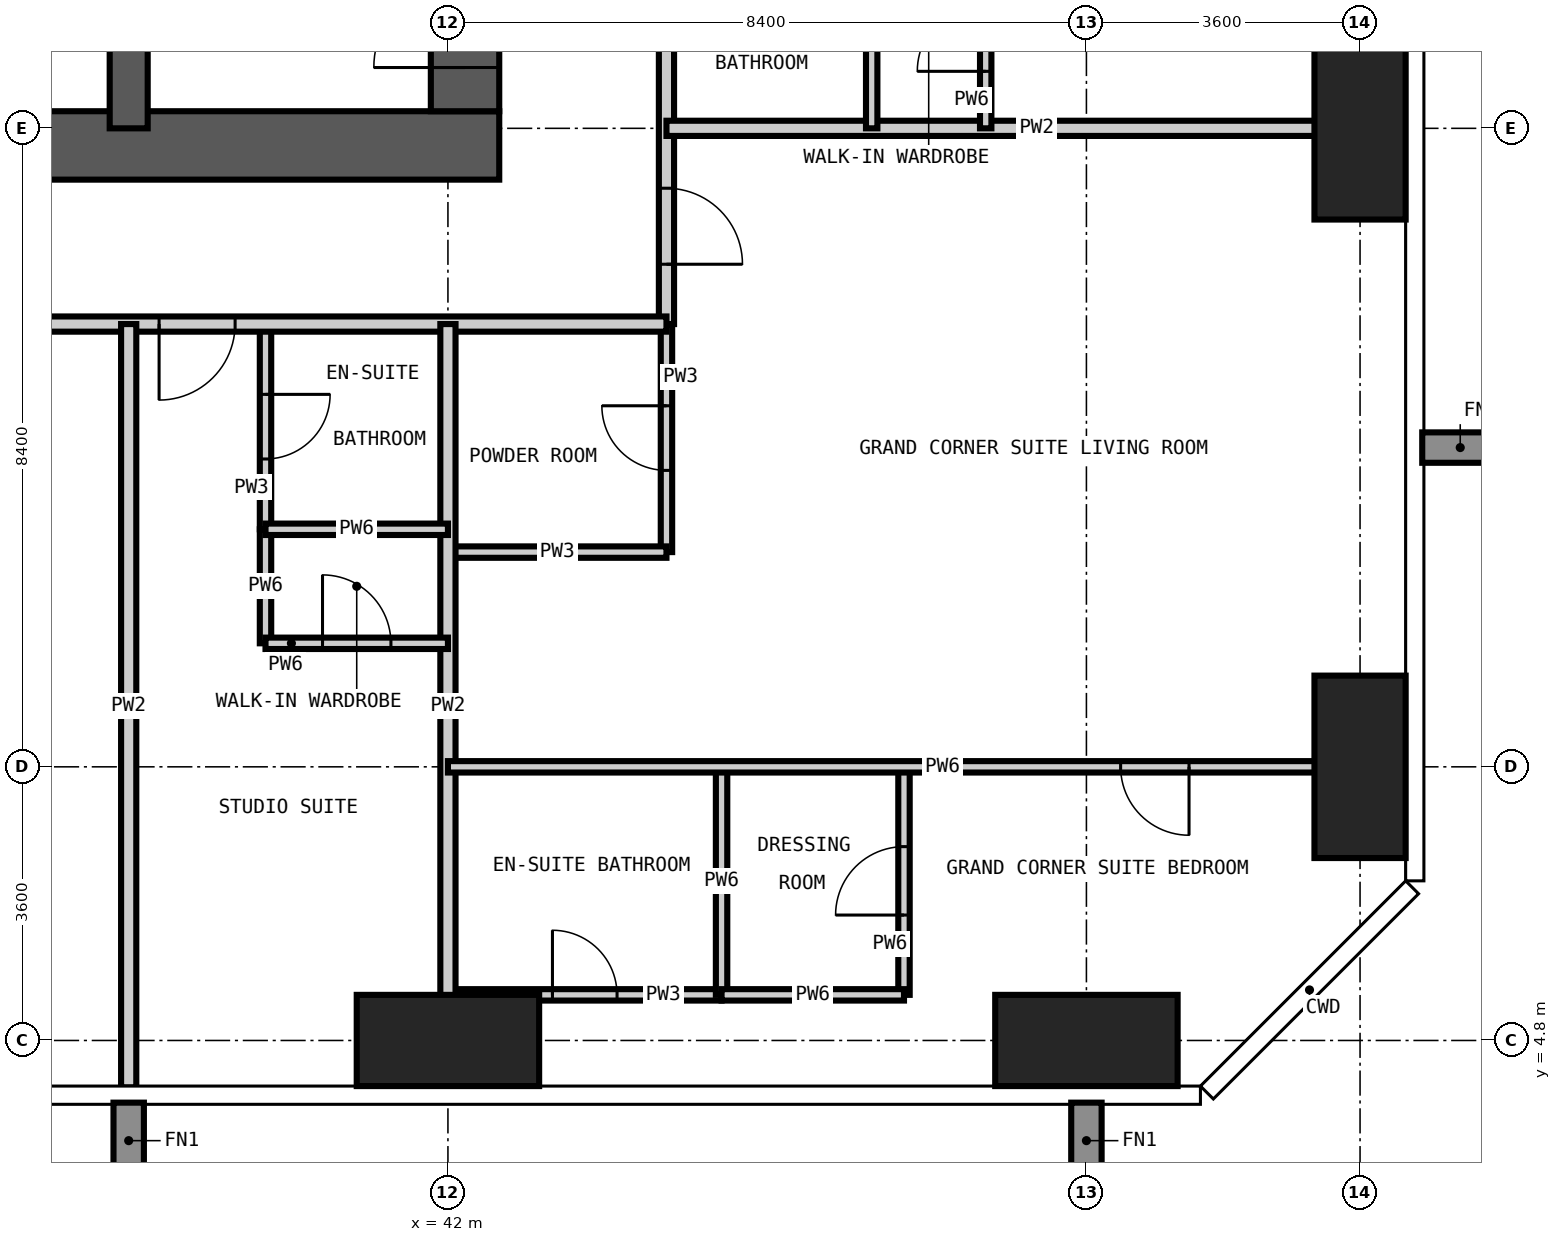
"""IFC4 building model, lengths in metres.
Left out: names, types, materials, properties, quantities, classifications, styles, units other than length and angle.
Written with IfcOpenShell. Run it as: python <this file> out.ifc"""

import sys

from ifc_helpers import new_model, si_unit, direction, frame, frame_2d, origin, origin_2d, place, context, subcontext, project, spatial, rectangle, extrude, element, fill, save


model = new_model("IFC4")
c1 = context("Model", 3, precision=1e-05, world=origin(), true_north=direction((0.0, 1.0)))
c2 = subcontext(c1, "Body", "Model", "MODEL_VIEW")
j1 = project(units=[si_unit("LENGTHUNIT", "METRE"), si_unit("PLANEANGLEUNIT", "RADIAN")], contexts=[c1])
p1 = place(None, origin())
s1 = spatial("IfcSite", under=j1, at=p1, CompositionType="ELEMENT")
p2 = place(p1, origin())
s2 = spatial("IfcBuilding", under=s1, at=p2, CompositionType="ELEMENT")
p3 = place(p2, frame((0.0, 0.0, 233.4)))
s3 = spatial("IfcBuildingStorey", under=s2, at=p3, CompositionType="ELEMENT", Elevation=233.4)
for number, where, z_axis, x_axis in (
    (1, (42.0, 4.8, -0.35), (0.0, 0.0, 1.0), (1.0, 0.0, 0.0)),
    (2, (50.4, 4.8, -0.35), (0.0, 0.0, 1.0), (1.0, 0.0, 0.0)),
):
    element("IfcColumn", number, at=place(p3, frame(where, z_axis=z_axis, x_axis=x_axis)), inside=s3, PredefinedType="COLUMN", context=c2, shape_type="SweptSolid", body=[
        extrude(rectangle(XDim=2.4, YDim=1.2, at=origin_2d()), origin(), (0.0, 0.0, 1.0), 3.9),
    ])
for number, where, z_axis, x_axis in (
    (3, (54.0, 8.4, -0.35), (0.0, 0.0, 1.0), (1.0, 0.0, 0.0)),
    (4, (54.0, 16.8, -0.35), (0.0, 0.0, 1.0), (1.0, 0.0, 0.0)),
):
    element("IfcColumn", number, at=place(p3, frame(where, z_axis=z_axis, x_axis=x_axis)), inside=s3, PredefinedType="COLUMN", context=c2, shape_type="SweptSolid", body=[
        extrude(rectangle(XDim=1.2, YDim=2.4, at=origin_2d()), origin(), (0.0, 0.0, 1.0), 3.9),
    ])
p4 = place(p3, frame((24.525, 16.575, -0.35), z_axis=(0.0, 0.0, 1.0), x_axis=(1.0, 0.0, 0.0)))
e5 = element("IfcWall", 5, at=p4, inside=s3, PredefinedType="SHEAR", context=c2, shape_type="SweptSolid", body=[
    extrude(rectangle(XDim=18.15, YDim=0.9, at=frame_2d((9.075, 0.0))), origin(), (0.0, 0.0, 1.0), 3.9),
])
p5 = place(p4, frame((4.375, 0.0, 0.35)))
e6 = element("IfcOpeningElement", 6, at=p5, cuts=e5, PredefinedType="OPENING", context=c2, shape_type="SweptSolid", body=[
    extrude(rectangle(XDim=1.0, YDim=2.1, at=frame_2d((0.5, 1.05))), frame((0.0, 0.46, 0.0), z_axis=(0.0, -1.0, 0.0), x_axis=(1.0, 0.0, 0.0)), (0.0, 0.0, 1.0), 0.92),
])
p6 = place(p4, frame((10.675, 0.0, 0.35)))
e7 = element("IfcOpeningElement", 7, at=p6, cuts=e5, PredefinedType="OPENING", context=c2, shape_type="SweptSolid", body=[
    extrude(rectangle(XDim=1.0, YDim=2.1, at=frame_2d((0.5, 1.05))), frame((0.0, 0.46, 0.0), z_axis=(0.0, -1.0, 0.0), x_axis=(1.0, 0.0, 0.0)), (0.0, 0.0, 1.0), 0.92),
])
p7 = place(p3, frame((42.225, 17.025, -0.35), z_axis=(0.0, 0.0, 1.0), x_axis=(0.0, 1.0, 0.0)))
e8 = element("IfcWall", 8, at=p7, inside=s3, PredefinedType="SHEAR", context=c2, shape_type="SweptSolid", body=[
    extrude(rectangle(XDim=24.75, YDim=0.9, at=frame_2d((12.375, 0.0))), origin(), (0.0, 0.0, 1.0), 3.9),
])
p8 = place(p7, frame((0.575, 0.0, 0.35)))
e9 = element("IfcOpeningElement", 9, at=p8, cuts=e8, PredefinedType="OPENING", context=c2, shape_type="SweptSolid", body=[
    extrude(rectangle(XDim=1.2, YDim=2.2, at=frame_2d((0.6, 1.1))), frame((0.0, 0.46, 0.0), z_axis=(0.0, -1.0, 0.0), x_axis=(1.0, 0.0, 0.0)), (0.0, 0.0, 1.0), 0.92),
])
p9 = place(p7, frame((11.475, 0.0, 0.35)))
e10 = element("IfcOpeningElement", 10, at=p9, cuts=e8, PredefinedType="OPENING", context=c2, shape_type="SweptSolid", body=[
    extrude(rectangle(XDim=1.8, YDim=2.2, at=frame_2d((0.9, 1.1))), frame((0.0, 0.46, 0.0), z_axis=(0.0, -1.0, 0.0), x_axis=(1.0, 0.0, 0.0)), (0.0, 0.0, 1.0), 0.92),
])
p10 = place(p7, frame((20.275, 0.0, 0.35)))
e11 = element("IfcOpeningElement", 11, at=p10, cuts=e8, PredefinedType="OPENING", context=c2, shape_type="SweptSolid", body=[
    extrude(rectangle(XDim=1.0, YDim=2.1, at=frame_2d((0.5, 1.05))), frame((0.0, 0.46, 0.0), z_axis=(0.0, -1.0, 0.0), x_axis=(1.0, 0.0, 0.0)), (0.0, 0.0, 1.0), 0.92),
])
p11 = place(p3, frame((37.8, 16.8, -0.35), z_axis=(0.0, 0.0, 1.0), x_axis=(0.0, 1.0, 0.0)))
e12 = element("IfcWall", 12, at=p11, inside=s3, PredefinedType="SHEAR", context=c2, shape_type="SweptSolid", body=[
    extrude(rectangle(XDim=11.2, YDim=0.5, at=frame_2d((5.6, 0.0))), origin(), (0.0, 0.0, 1.0), 3.9),
])
p12 = place(p3, frame((39.6, 11.525, 0.0), z_axis=(0.0, 0.0, 1.0), x_axis=(0.0, 1.0, 0.0)))
e13 = element("IfcWall", 13, at=p12, inside=s3, PredefinedType="PARTITIONING", context=c2, shape_type="SweptSolid", body=[
    extrude(rectangle(XDim=2.7, YDim=0.15, at=frame_2d((1.35, 0.0))), origin(), (0.0, 0.0, 1.0), 3.55),
])
p13 = place(p12, frame((0.925, 0.0, 0.0)))
e14 = element("IfcOpeningElement", 14, at=p13, cuts=e13, PredefinedType="OPENING", context=c2, shape_type="SweptSolid", body=[
    extrude(rectangle(XDim=0.85, YDim=2.1, at=frame_2d((0.425, 1.05))), frame((0.0, 0.085, 0.0), z_axis=(0.0, -1.0, 0.0), x_axis=(1.0, 0.0, 0.0)), (0.0, 0.0, 1.0), 0.17),
])
p14 = place(p3, frame((44.875, 11.225, 0.0), z_axis=(0.0, 0.0, 1.0), x_axis=(0.0, 1.0, 0.0)))
e15 = element("IfcWall", 15, at=p14, inside=s3, PredefinedType="PARTITIONING", context=c2, shape_type="SweptSolid", body=[
    extrude(rectangle(XDim=3.0, YDim=0.15, at=frame_2d((1.5, 0.0))), origin(), (0.0, 0.0, 1.0), 3.55),
])
p15 = place(p14, frame((1.075, 0.0, 0.0)))
e16 = element("IfcOpeningElement", 16, at=p15, cuts=e15, PredefinedType="OPENING", context=c2, shape_type="SweptSolid", body=[
    extrude(rectangle(XDim=0.85, YDim=2.1, at=frame_2d((0.425, 1.05))), frame((0.0, 0.085, 0.0), z_axis=(0.0, -1.0, 0.0), x_axis=(1.0, 0.0, 0.0)), (0.0, 0.0, 1.0), 0.17),
])
p16 = place(p3, frame((42.0, 5.4, 0.0), z_axis=(0.0, 0.0, 1.0), x_axis=(1.0, 0.0, 0.0)))
e17 = element("IfcWall", 17, at=p16, inside=s3, PredefinedType="PARTITIONING", context=c2, shape_type="SweptSolid", body=[
    extrude(rectangle(XDim=3.6, YDim=0.15, at=frame_2d((1.8, 0.0))), origin(), (0.0, 0.0, 1.0), 3.55),
])
p17 = place(p16, frame((1.375, 0.0, 0.0)))
e18 = element("IfcOpeningElement", 18, at=p17, cuts=e17, PredefinedType="OPENING", context=c2, shape_type="SweptSolid", body=[
    extrude(rectangle(XDim=0.85, YDim=2.1, at=frame_2d((0.425, 1.05))), frame((0.0, 0.085, 0.0), z_axis=(0.0, -1.0, 0.0), x_axis=(1.0, 0.0, 0.0)), (0.0, 0.0, 1.0), 0.17),
])
p18 = place(p3, frame((42.0, 11.225, 0.0), z_axis=(0.0, 0.0, 1.0), x_axis=(1.0, 0.0, 0.0)))
e19 = element("IfcWall", 19, at=p18, inside=s3, PredefinedType="PARTITIONING", context=c2, shape_type="SweptSolid", body=[
    extrude(rectangle(XDim=2.875, YDim=0.15, at=frame_2d((1.438, 0.0))), origin(), (0.0, 0.0, 1.0), 3.55),
])
p19 = place(p3, frame((44.875, 29.4, 0.0), z_axis=(0.0, 0.0, 1.0), x_axis=(0.0, -1.0, 0.0)))
e20 = element("IfcWall", 20, at=p19, inside=s3, PredefinedType="PARTITIONING", context=c2, shape_type="SweptSolid", body=[
    extrude(rectangle(XDim=15.175, YDim=0.2, at=frame_2d((7.587, 0.0))), origin(), (0.0, 0.0, 1.0), 3.55),
])
p20 = place(p19, frame((5.8, 0.0, 0.0)))
e21 = element("IfcOpeningElement", 21, at=p20, cuts=e20, PredefinedType="OPENING", context=c2, shape_type="SweptSolid", body=[
    extrude(rectangle(XDim=1.0, YDim=2.2, at=frame_2d((0.5, 1.1))), frame((0.0, 0.11, 0.0), z_axis=(0.0, -1.0, 0.0), x_axis=(1.0, 0.0, 0.0)), (0.0, 0.0, 1.0), 0.22),
])
p21 = place(p19, frame((13.388, 0.0, 0.0)))
e22 = element("IfcOpeningElement", 22, at=p21, cuts=e20, PredefinedType="OPENING", context=c2, shape_type="SweptSolid", body=[
    extrude(rectangle(XDim=1.0, YDim=2.2, at=frame_2d((0.5, 1.1))), frame((0.0, 0.11, 0.0), z_axis=(0.0, -1.0, 0.0), x_axis=(1.0, 0.0, 0.0)), (0.0, 0.0, 1.0), 0.22),
])
p22 = place(p3, frame((44.875, 14.225, 0.0), z_axis=(0.0, 0.0, 1.0), x_axis=(-1.0, 0.0, 0.0)))
e23 = element("IfcWall", 23, at=p22, inside=s3, PredefinedType="PARTITIONING", context=c2, shape_type="SweptSolid", body=[
    extrude(rectangle(XDim=22.25, YDim=0.2, at=frame_2d((11.125, 0.0))), origin(), (0.0, 0.0, 1.0), 3.55),
])
p23 = place(p22, frame((15.875, 0.0, 0.0)))
e24 = element("IfcOpeningElement", 24, at=p23, cuts=e23, PredefinedType="OPENING", context=c2, shape_type="SweptSolid", body=[
    extrude(rectangle(XDim=1.0, YDim=2.2, at=frame_2d((0.5, 1.1))), frame((0.0, 0.11, 0.0), z_axis=(0.0, -1.0, 0.0), x_axis=(1.0, 0.0, 0.0)), (0.0, 0.0, 1.0), 0.22),
])
p24 = place(p22, frame((9.425, 0.0, 0.0)))
e25 = element("IfcOpeningElement", 25, at=p24, cuts=e23, PredefinedType="OPENING", context=c2, shape_type="SweptSolid", body=[
    extrude(rectangle(XDim=1.0, YDim=2.2, at=frame_2d((0.5, 1.1))), frame((0.0, 0.11, 0.0), z_axis=(0.0, -1.0, 0.0), x_axis=(1.0, 0.0, 0.0)), (0.0, 0.0, 1.0), 0.22),
])
p25 = place(p22, frame((5.675, 0.0, 0.0)))
e26 = element("IfcOpeningElement", 26, at=p25, cuts=e23, PredefinedType="OPENING", context=c2, shape_type="SweptSolid", body=[
    extrude(rectangle(XDim=1.0, YDim=2.2, at=frame_2d((0.5, 1.1))), frame((0.0, 0.11, 0.0), z_axis=(0.0, -1.0, 0.0), x_axis=(1.0, 0.0, 0.0)), (0.0, 0.0, 1.0), 0.22),
])
for number, where, z_axis, x_axis in (
    (27, (37.8, 4.182, 0.0), (0.0, 0.0, 1.0), (0.0, 1.0, 0.0)),
    (28, (42.0, 4.182, 0.0), (0.0, 0.0, 1.0), (0.0, 1.0, 0.0)),
):
    element("IfcWall", number, at=place(p3, frame(where, z_axis=z_axis, x_axis=x_axis)), inside=s3, PredefinedType="PARTITIONING", context=c2, shape_type="SweptSolid", body=[
        extrude(rectangle(XDim=10.043, YDim=0.2, at=frame_2d((5.021, 0.0))), origin(), (0.0, 0.0, 1.0), 3.55),
    ])
p26 = place(p3, frame((44.875, 16.8, 0.0), z_axis=(0.0, 0.0, 1.0), x_axis=(1.0, 0.0, 0.0)))
e29 = element("IfcWall", 29, at=p26, inside=s3, PredefinedType="PARTITIONING", context=c2, shape_type="SweptSolid", body=[
    extrude(rectangle(XDim=9.743, YDim=0.2, at=frame_2d((4.872, 0.0))), origin(), (0.0, 0.0, 1.0), 3.55),
])
p27 = place(p3, frame((39.6, 10.025, 0.0), z_axis=(0.0, 0.0, 1.0), x_axis=(0.0, 1.0, 0.0)))
e30 = element("IfcWall", 30, at=p27, inside=s3, PredefinedType="PARTITIONING", context=c2, shape_type="SweptSolid", body=[
    extrude(rectangle(XDim=1.5, YDim=0.15, at=frame_2d((0.75, 0.0))), origin(), (0.0, 0.0, 1.0), 3.55),
])
p28 = place(p3, frame((45.6, 5.4, 0.0), z_axis=(0.0, 0.0, 1.0), x_axis=(0.0, 1.0, 0.0)))
e31 = element("IfcWall", 31, at=p28, inside=s3, PredefinedType="PARTITIONING", context=c2, shape_type="SweptSolid", body=[
    extrude(rectangle(XDim=3.0, YDim=0.15, at=frame_2d((1.5, 0.0))), origin(), (0.0, 0.0, 1.0), 3.55),
])
p29 = place(p3, frame((47.575, 16.8, 0.0), z_axis=(0.0, 0.0, 1.0), x_axis=(0.0, 1.0, 0.0)))
e32 = element("IfcWall", 32, at=p29, inside=s3, PredefinedType="PARTITIONING", context=c2, shape_type="SweptSolid", body=[
    extrude(rectangle(XDim=2.4, YDim=0.15, at=frame_2d((1.2, 0.0))), origin(), (0.0, 0.0, 1.0), 3.55),
])
p30 = place(p3, frame((48.0, 5.4, 0.0), z_axis=(0.0, 0.0, 1.0), x_axis=(0.0, 1.0, 0.0)))
e33 = element("IfcWall", 33, at=p30, inside=s3, PredefinedType="PARTITIONING", context=c2, shape_type="SweptSolid", body=[
    extrude(rectangle(XDim=3.0, YDim=0.15, at=frame_2d((1.5, 0.0))), origin(), (0.0, 0.0, 1.0), 3.55),
])
p31 = place(p30, frame((1.05, 0.0, 0.0)))
e34 = element("IfcOpeningElement", 34, at=p31, cuts=e33, PredefinedType="OPENING", context=c2, shape_type="SweptSolid", body=[
    extrude(rectangle(XDim=0.9, YDim=2.1, at=frame_2d((0.45, 1.05))), frame((0.0, 0.085, 0.0), z_axis=(0.0, -1.0, 0.0), x_axis=(1.0, 0.0, 0.0)), (0.0, 0.0, 1.0), 0.17),
])
p32 = place(p3, frame((49.075, 16.8, 0.0), z_axis=(0.0, 0.0, 1.0), x_axis=(0.0, 1.0, 0.0)))
e35 = element("IfcWall", 35, at=p32, inside=s3, PredefinedType="PARTITIONING", context=c2, shape_type="SweptSolid", body=[
    extrude(rectangle(XDim=2.4, YDim=0.15, at=frame_2d((1.2, 0.0))), origin(), (0.0, 0.0, 1.0), 3.55),
])
p33 = place(p32, frame((0.75, 0.0, 0.0)))
e36 = element("IfcOpeningElement", 36, at=p33, cuts=e35, PredefinedType="OPENING", context=c2, shape_type="SweptSolid", body=[
    extrude(rectangle(XDim=0.9, YDim=2.1, at=frame_2d((0.45, 1.05))), frame((0.0, 0.085, 0.0), z_axis=(0.0, -1.0, 0.0), x_axis=(1.0, 0.0, 0.0)), (0.0, 0.0, 1.0), 0.17),
])
p34 = place(p3, frame((45.6, 5.4, 0.0), z_axis=(0.0, 0.0, 1.0), x_axis=(1.0, 0.0, 0.0)))
e37 = element("IfcWall", 37, at=p34, inside=s3, PredefinedType="PARTITIONING", context=c2, shape_type="SweptSolid", body=[
    extrude(rectangle(XDim=2.4, YDim=0.15, at=frame_2d((1.2, 0.0))), origin(), (0.0, 0.0, 1.0), 3.55),
])
p35 = place(p3, frame((42.0, 8.4, 0.0), z_axis=(0.0, 0.0, 1.0), x_axis=(1.0, 0.0, 0.0)))
e38 = element("IfcWall", 38, at=p35, inside=s3, PredefinedType="PARTITIONING", context=c2, shape_type="SweptSolid", body=[
    extrude(rectangle(XDim=12.618, YDim=0.15, at=frame_2d((6.309, 0.0))), origin(), (0.0, 0.0, 1.0), 3.55),
])
p36 = place(p35, frame((8.85, 0.0, 0.0)))
e39 = element("IfcOpeningElement", 39, at=p36, cuts=e38, PredefinedType="OPENING", context=c2, shape_type="SweptSolid", body=[
    extrude(rectangle(XDim=0.9, YDim=2.1, at=frame_2d((0.45, 1.05))), frame((0.0, 0.085, 0.0), z_axis=(0.0, -1.0, 0.0), x_axis=(1.0, 0.0, 0.0)), (0.0, 0.0, 1.0), 0.17),
])
p37 = place(p3, frame((39.6, 10.025, 0.0), z_axis=(0.0, 0.0, 1.0), x_axis=(1.0, 0.0, 0.0)))
e40 = element("IfcWall", 40, at=p37, inside=s3, PredefinedType="PARTITIONING", context=c2, shape_type="SweptSolid", body=[
    extrude(rectangle(XDim=2.4, YDim=0.15, at=frame_2d((1.2, 0.0))), origin(), (0.0, 0.0, 1.0), 3.55),
])
p38 = place(p37, frame((0.75, 0.0, 0.0)))
e41 = element("IfcOpeningElement", 41, at=p38, cuts=e40, PredefinedType="OPENING", context=c2, shape_type="SweptSolid", body=[
    extrude(rectangle(XDim=0.9, YDim=2.1, at=frame_2d((0.45, 1.05))), frame((0.0, 0.085, 0.0), z_axis=(0.0, -1.0, 0.0), x_axis=(1.0, 0.0, 0.0)), (0.0, 0.0, 1.0), 0.17),
])
p39 = place(p3, frame((39.6, 11.525, 0.0), z_axis=(0.0, 0.0, 1.0), x_axis=(1.0, 0.0, 0.0)))
e42 = element("IfcWall", 42, at=p39, inside=s3, PredefinedType="PARTITIONING", context=c2, shape_type="SweptSolid", body=[
    extrude(rectangle(XDim=2.4, YDim=0.15, at=frame_2d((1.2, 0.0))), origin(), (0.0, 0.0, 1.0), 3.55),
])
p40 = place(p8, origin())
e43 = element("IfcDoor", 43, at=p40, inside=s3, OperationType="SINGLE_SWING_LEFT", PredefinedType="DOOR", context=c2, shape_type="SweptSolid", body=[
    extrude(rectangle(XDim=1.2, YDim=2.2, at=frame_2d((0.6, 1.1))), frame((0.0, 0.025, 0.0), z_axis=(0.0, -1.0, 0.0), x_axis=(1.0, 0.0, 0.0)), (0.0, 0.0, 1.0), 0.05),
])
fill(e9, e43)
p41 = place(p25, origin())
e44 = element("IfcDoor", 44, at=p41, inside=s3, OperationType="SINGLE_SWING_RIGHT", PredefinedType="DOOR", context=c2, shape_type="SweptSolid", body=[
    extrude(rectangle(XDim=1.0, YDim=2.2, at=frame_2d((0.5, 1.1))), frame((0.0, 0.025, 0.0), z_axis=(0.0, -1.0, 0.0), x_axis=(1.0, 0.0, 0.0)), (0.0, 0.0, 1.0), 0.05),
])
fill(e26, e44)
p42 = place(p13, frame((0.85, 0.0, 0.0), z_axis=(0.0, 0.0, 1.0), x_axis=(-1.0, 0.0, 0.0)))
e45 = element("IfcDoor", 45, at=p42, inside=s3, OperationType="SINGLE_SWING_LEFT", PredefinedType="DOOR", context=c2, shape_type="SweptSolid", body=[
    extrude(rectangle(XDim=0.85, YDim=2.1, at=frame_2d((0.425, 1.05))), frame((0.0, 0.025, 0.0), z_axis=(0.0, -1.0, 0.0), x_axis=(1.0, 0.0, 0.0)), (0.0, 0.0, 1.0), 0.05),
])
fill(e14, e45)
p43 = place(p38, origin())
e46 = element("IfcDoor", 46, at=p43, inside=s3, OperationType="SINGLE_SWING_LEFT", PredefinedType="DOOR", context=c2, shape_type="SweptSolid", body=[
    extrude(rectangle(XDim=0.9, YDim=2.1, at=frame_2d((0.45, 1.05))), frame((0.0, 0.025, 0.0), z_axis=(0.0, -1.0, 0.0), x_axis=(1.0, 0.0, 0.0)), (0.0, 0.0, 1.0), 0.05),
])
fill(e41, e46)
p44 = place(p33, origin())
e47 = element("IfcDoor", 47, at=p44, inside=s3, OperationType="SINGLE_SWING_LEFT", PredefinedType="DOOR", context=c2, shape_type="SweptSolid", body=[
    extrude(rectangle(XDim=0.9, YDim=2.1, at=frame_2d((0.45, 1.05))), frame((0.0, 0.025, 0.0), z_axis=(0.0, -1.0, 0.0), x_axis=(1.0, 0.0, 0.0)), (0.0, 0.0, 1.0), 0.05),
])
fill(e36, e47)
p45 = place(p21, origin())
e48 = element("IfcDoor", 48, at=p45, inside=s3, OperationType="SINGLE_SWING_RIGHT", PredefinedType="DOOR", context=c2, shape_type="SweptSolid", body=[
    extrude(rectangle(XDim=1.0, YDim=2.2, at=frame_2d((0.5, 1.1))), frame((0.0, 0.025, 0.0), z_axis=(0.0, -1.0, 0.0), x_axis=(1.0, 0.0, 0.0)), (0.0, 0.0, 1.0), 0.05),
])
fill(e22, e48)
p46 = place(p15, origin())
e49 = element("IfcDoor", 49, at=p46, inside=s3, OperationType="SINGLE_SWING_RIGHT", PredefinedType="DOOR", context=c2, shape_type="SweptSolid", body=[
    extrude(rectangle(XDim=0.85, YDim=2.1, at=frame_2d((0.425, 1.05))), frame((0.0, 0.025, 0.0), z_axis=(0.0, -1.0, 0.0), x_axis=(1.0, 0.0, 0.0)), (0.0, 0.0, 1.0), 0.05),
])
fill(e16, e49)
p47 = place(p36, frame((0.9, 0.0, 0.0), z_axis=(0.0, 0.0, 1.0), x_axis=(-1.0, 0.0, 0.0)))
e50 = element("IfcDoor", 50, at=p47, inside=s3, OperationType="SINGLE_SWING_LEFT", PredefinedType="DOOR", context=c2, shape_type="SweptSolid", body=[
    extrude(rectangle(XDim=0.9, YDim=2.1, at=frame_2d((0.45, 1.05))), frame((0.0, 0.025, 0.0), z_axis=(0.0, -1.0, 0.0), x_axis=(1.0, 0.0, 0.0)), (0.0, 0.0, 1.0), 0.05),
])
fill(e39, e50)
p48 = place(p17, origin())
e51 = element("IfcDoor", 51, at=p48, inside=s3, OperationType="SINGLE_SWING_LEFT", PredefinedType="DOOR", context=c2, shape_type="SweptSolid", body=[
    extrude(rectangle(XDim=0.85, YDim=2.1, at=frame_2d((0.425, 1.05))), frame((0.0, 0.025, 0.0), z_axis=(0.0, -1.0, 0.0), x_axis=(1.0, 0.0, 0.0)), (0.0, 0.0, 1.0), 0.05),
])
fill(e18, e51)
p49 = place(p31, origin())
e52 = element("IfcDoor", 52, at=p49, inside=s3, OperationType="SINGLE_SWING_LEFT", PredefinedType="DOOR", context=c2, shape_type="SweptSolid", body=[
    extrude(rectangle(XDim=0.9, YDim=2.1, at=frame_2d((0.45, 1.05))), frame((0.0, 0.025, 0.0), z_axis=(0.0, -1.0, 0.0), x_axis=(1.0, 0.0, 0.0)), (0.0, 0.0, 1.0), 0.05),
])
fill(e34, e52)
save(model, sys.argv[1])
